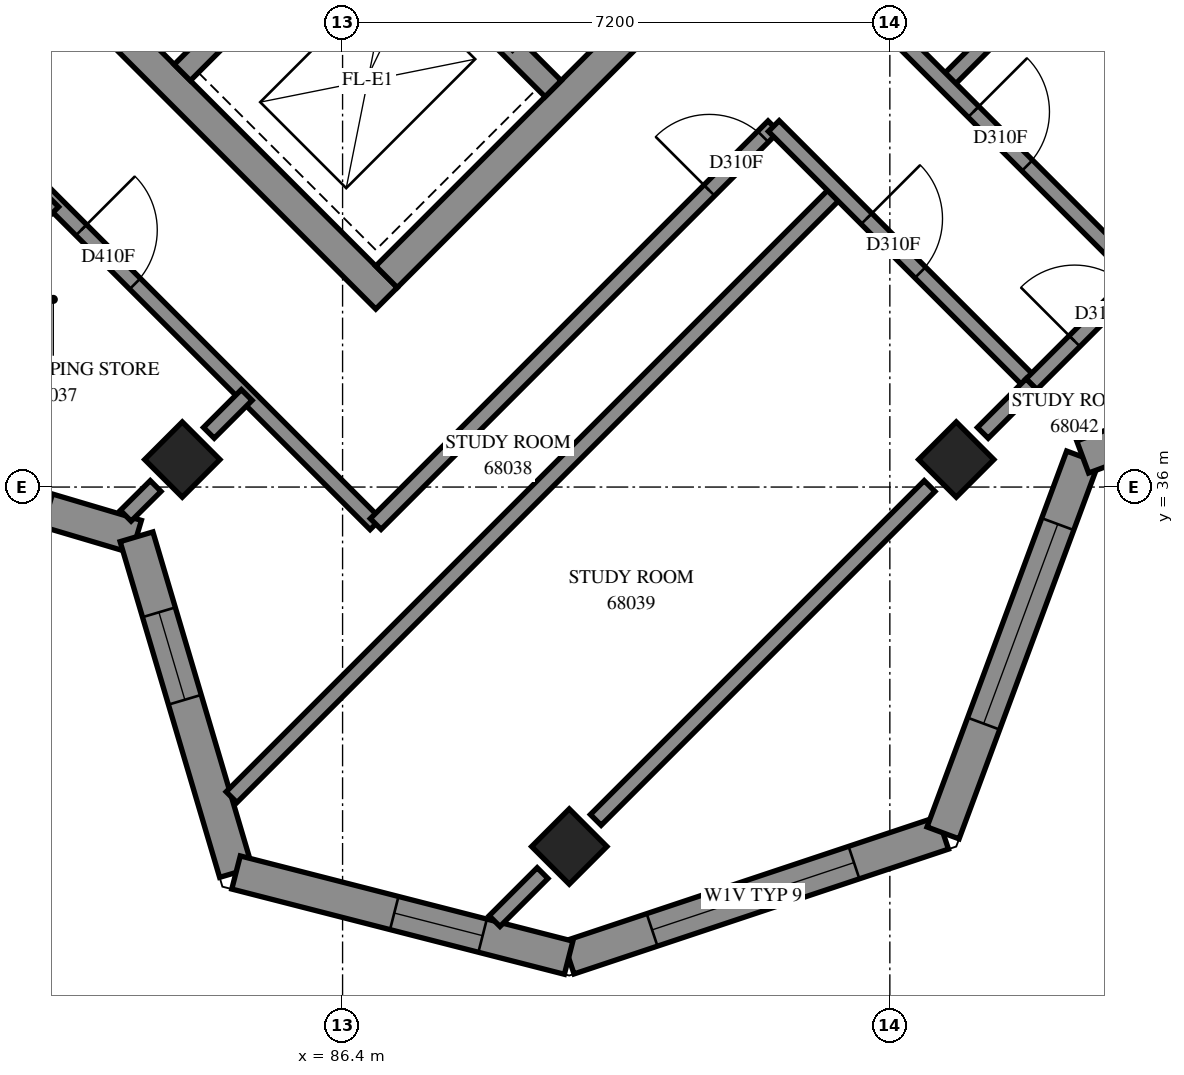
"""IFC4 building model, lengths in metres.
Left out: names, types, materials, properties, quantities, classifications, styles, units other than length and angle.
Written with IfcOpenShell. Run it as: python <this file> out.ifc"""

import sys

from ifc_helpers import new_model, si_unit, direction, frame, frame_2d, origin, origin_2d, place, context, subcontext, project, spatial, polyline, rectangle, outline, extrude, element, fill, save


model = new_model("IFC4")
c1 = context("Model", 3, precision=1e-05, world=origin(), true_north=direction((0.0, 1.0)))
c2 = subcontext(c1, "Body", "Model", "MODEL_VIEW")
j1 = project(units=[si_unit("LENGTHUNIT", "METRE"), si_unit("PLANEANGLEUNIT", "RADIAN")], contexts=[c1])
p1 = place(None, origin())
s1 = spatial("IfcSite", under=j1, at=p1, CompositionType="ELEMENT")
p2 = place(p1, origin())
s2 = spatial("IfcBuilding", under=s1, at=p2, CompositionType="ELEMENT")
p3 = place(p2, frame((0.0, 0.0, 250.6)))
s3 = spatial("IfcBuildingStorey", under=s2, at=p3, CompositionType="ELEMENT", Elevation=250.6)
for number, where, z_axis, x_axis in (
    (1, (84.291, 36.362, 0.0), (0.0, 0.0, 1.0), (0.707, -0.707, 0.0)),
    (2, (94.474, 36.362, 0.0), (0.0, 0.0, 1.0), (0.707, -0.707, 0.0)),
    (3, (89.382, 31.271, 0.0), (0.0, 0.0, 1.0), (0.707, -0.707, 0.0)),
):
    element("IfcColumn", number, at=place(p3, frame(where, z_axis=z_axis, x_axis=x_axis)), inside=s3, PredefinedType="COLUMN", context=c2, shape_type="SweptSolid", body=[
        extrude(rectangle(XDim=0.7, YDim=0.7, at=origin_2d()), origin(), (0.0, 0.0, 1.0), 3.1),
    ])
p4 = place(p3, frame((76.23, 49.231, -0.3), z_axis=(0.0, 0.0, 1.0), x_axis=(0.7071034917, -0.7071100706, 0.0)))
e4 = element("IfcWall", 4, at=p4, inside=s3, PredefinedType="SHEAR", context=c2, shape_type="SweptSolid", body=[
    extrude(rectangle(XDim=15.2, YDim=0.4, at=frame_2d((7.6, 0.0))), origin(), (0.0, 0.0, 1.0), 2.7),
])
p5 = place(p3, frame((86.978, 38.766, -0.3), z_axis=(0.0, 0.0, 1.0), x_axis=(0.7071067812, 0.7071067812, 0.0)))
e5 = element("IfcWall", 5, at=p5, inside=s3, PredefinedType="SHEAR", context=c2, shape_type="SweptSolid", body=[
    extrude(rectangle(XDim=14.4, YDim=0.4, at=frame_2d((7.2, 0.0))), origin(), (0.0, 0.0, 1.0), 2.7),
])
p6 = place(p5, frame((4.55, 0.0, 0.3)))
e6 = element("IfcOpeningElement", 6, at=p6, cuts=e5, PredefinedType="OPENING", context=c2, shape_type="SweptSolid", body=[
    extrude(rectangle(XDim=1.1, YDim=2.1, at=frame_2d((0.55, 1.05))), frame((0.0, 0.21, 0.0), z_axis=(0.0, -1.0, 0.0), x_axis=(1.0, 0.0, 0.0)), (0.0, 0.0, 1.0), 0.42),
])
p7 = place(p5, frame((11.35, 0.0, 0.3)))
e7 = element("IfcOpeningElement", 7, at=p7, cuts=e5, PredefinedType="OPENING", context=c2, shape_type="SweptSolid", body=[
    extrude(rectangle(XDim=1.1, YDim=2.1, at=frame_2d((0.55, 1.05))), frame((0.0, 0.21, 0.0), z_axis=(0.0, -1.0, 0.0), x_axis=(1.0, 0.0, 0.0)), (0.0, 0.0, 1.0), 0.42),
])
p8 = place(p3, frame((84.291, 41.453, 0.0), z_axis=(0.0, 0.0, 1.0), x_axis=(0.7071067812, 0.7071067812, 0.0)))
e8 = element("IfcWall", 8, at=p8, inside=s3, PredefinedType="SOLIDWALL", context=c2, shape_type="SweptSolid", body=[
    extrude(rectangle(XDim=3.3, YDim=0.3, at=frame_2d((1.65, 0.0))), origin(), (0.0, 0.0, 1.0), 3.1),
])
p9 = place(p3, frame((78.988, 51.423, 0.0), z_axis=(0.0, 0.0, 1.0), x_axis=(0.7071067812, -0.7071067812, 0.0)))
e9 = element("IfcWall", 9, at=p9, inside=s3, PredefinedType="SOLIDWALL", context=c2, shape_type="SweptSolid", body=[
    extrude(rectangle(XDim=14.4, YDim=0.3, at=frame_2d((7.2, 0.0))), origin(), (0.0, 0.0, 1.0), 3.1),
])
p10 = place(p9, frame((1.35, 0.0, 0.0)))
e10 = element("IfcOpeningElement", 10, at=p10, cuts=e9, PredefinedType="OPENING", context=c2, shape_type="SweptSolid", body=[
    extrude(rectangle(XDim=0.9, YDim=2.1, at=frame_2d((0.45, 1.05))), frame((0.0, 0.16, 0.0), z_axis=(0.0, -1.0, 0.0), x_axis=(1.0, 0.0, 0.0)), (0.0, 0.0, 1.0), 0.32),
])
p11 = place(p9, frame((4.95, 0.0, 0.0)))
e11 = element("IfcOpeningElement", 11, at=p11, cuts=e9, PredefinedType="OPENING", context=c2, shape_type="SweptSolid", body=[
    extrude(rectangle(XDim=0.9, YDim=2.1, at=frame_2d((0.45, 1.05))), frame((0.0, 0.16, 0.0), z_axis=(0.0, -1.0, 0.0), x_axis=(1.0, 0.0, 0.0)), (0.0, 0.0, 1.0), 0.32),
])
p12 = place(p9, frame((8.55, 0.0, 0.0)))
e12 = element("IfcOpeningElement", 12, at=p12, cuts=e9, PredefinedType="OPENING", context=c2, shape_type="SweptSolid", body=[
    extrude(rectangle(XDim=0.9, YDim=2.1, at=frame_2d((0.45, 1.05))), frame((0.0, 0.16, 0.0), z_axis=(0.0, -1.0, 0.0), x_axis=(1.0, 0.0, 0.0)), (0.0, 0.0, 1.0), 0.32),
])
p13 = place(p9, frame((12.05, 0.0, 0.0)))
e13 = element("IfcOpeningElement", 13, at=p13, cuts=e9, PredefinedType="OPENING", context=c2, shape_type="SweptSolid", body=[
    extrude(rectangle(XDim=1.1, YDim=2.1, at=frame_2d((0.55, 1.05))), frame((0.0, 0.16, 0.0), z_axis=(0.0, -1.0, 0.0), x_axis=(1.0, 0.0, 0.0)), (0.0, 0.0, 1.0), 0.32),
])
p14 = place(p3, frame((89.374, 29.808, 0.0), z_axis=(0.0, 0.0, 1.0), x_axis=(0.9486852239, 0.3162219885, 0.0)))
e14 = element("IfcWall", 14, at=p14, inside=s3, PredefinedType="SOLIDWALL", context=c2, shape_type="SweptSolid", body=[
    extrude(outline(polyline([(-0.066, -0.225), (5.3, -0.225), (5.085, 0.225), (0.066, 0.225), (-0.066, -0.225)])), origin(), (0.0, 0.0, 1.0), 3.1),
])
p15 = place(p14, frame((1.157, 0.0, 0.45)))
e15 = element("IfcOpeningElement", 15, at=p15, cuts=e14, PredefinedType="OPENING", context=c2, shape_type="SweptSolid", body=[
    extrude(rectangle(XDim=2.8, YDim=2.55, at=frame_2d((1.4, 1.275))), frame((0.0, 0.235, 0.0), z_axis=(0.0, -1.0, 0.0), x_axis=(1.0, 0.0, 0.0)), (0.0, 0.0, 1.0), 0.47),
])
p16 = place(p3, frame((94.3, 31.45, 0.0), z_axis=(0.0, 0.0, 1.0), x_axis=(0.3481927166, 0.9374229739, 0.0)))
e16 = element("IfcWall", 16, at=p16, inside=s3, PredefinedType="SOLIDWALL", context=c2, shape_type="SweptSolid", body=[
    extrude(outline(polyline([(-0.108, -0.225), (5.172, -0.225), (5.379, 0.225), (0.108, 0.225), (-0.108, -0.225)])), origin(), (0.0, 0.0, 1.0), 3.1),
])
p17 = place(p16, frame((1.534, 0.0, 0.45)))
e17 = element("IfcOpeningElement", 17, at=p17, cuts=e16, PredefinedType="OPENING", context=c2, shape_type="SweptSolid", body=[
    extrude(rectangle(XDim=2.8, YDim=2.55, at=frame_2d((1.4, 1.275))), frame((0.0, 0.235, 0.0), z_axis=(0.0, -1.0, 0.0), x_axis=(1.0, 0.0, 0.0)), (0.0, 0.0, 1.0), 0.47),
])
p18 = place(p3, frame((96.137, 36.395, 0.0), z_axis=(0.0, 0.0, 1.0), x_axis=(0.937429161, 0.3481760591, 0.0)))
e18 = element("IfcWall", 18, at=p18, inside=s3, PredefinedType="SOLIDWALL", context=c2, shape_type="SweptSolid", body=[
    extrude(outline(polyline([(0.103, -0.225), (5.383, -0.225), (5.168, 0.225), (-0.103, 0.225), (0.103, -0.225)])), origin(), (0.0, 0.0, 1.0), 3.1),
])
p19 = place(p18, frame((1.651, 0.0, 0.45)))
e19 = element("IfcOpeningElement", 19, at=p19, cuts=e18, PredefinedType="OPENING", context=c2, shape_type="SweptSolid", body=[
    extrude(rectangle(XDim=2.8, YDim=2.55, at=frame_2d((1.4, 1.275))), frame((0.0, 0.235, 0.0), z_axis=(0.0, -1.0, 0.0), x_axis=(1.0, 0.0, 0.0)), (0.0, 0.0, 1.0), 0.47),
])
p20 = place(p3, frame((79.272, 36.655, 0.0), z_axis=(0.0, 0.0, 1.0), x_axis=(0.9587656954, -0.2841977151, 0.0)))
e20 = element("IfcWall", 20, at=p20, inside=s3, PredefinedType="SOLIDWALL", context=c2, shape_type="SweptSolid", body=[
    extrude(outline(polyline([(-0.128, -0.225), (4.484, -0.225), (4.729, 0.225), (0.128, 0.225), (-0.128, -0.225)])), origin(), (0.0, 0.0, 1.0), 3.1),
])
p21 = place(p20, frame((0.603, 0.0, 0.45)))
e21 = element("IfcOpeningElement", 21, at=p21, cuts=e20, PredefinedType="OPENING", context=c2, shape_type="SweptSolid", body=[
    extrude(rectangle(XDim=2.8, YDim=2.55, at=frame_2d((1.4, 1.275))), frame((0.0, 0.235, 0.0), z_axis=(0.0, -1.0, 0.0), x_axis=(1.0, 0.0, 0.0)), (0.0, 0.0, 1.0), 0.47),
])
p22 = place(p3, frame((83.689, 35.346, 0.0), z_axis=(0.0, 0.0, 1.0), x_axis=(0.2841977151, -0.9587656954, 0.0)))
e22 = element("IfcWall", 22, at=p22, inside=s3, PredefinedType="SOLIDWALL", context=c2, shape_type="SweptSolid", body=[
    extrude(outline(polyline([(0.122, -0.225), (4.734, -0.225), (4.479, 0.225), (-0.122, 0.225), (0.122, -0.225)])), origin(), (0.0, 0.0, 1.0), 3.1),
])
p23 = place(p22, frame((1.036, 0.0, 0.45)))
e23 = element("IfcOpeningElement", 23, at=p23, cuts=e22, PredefinedType="OPENING", context=c2, shape_type="SweptSolid", body=[
    extrude(rectangle(XDim=1.2, YDim=2.55, at=frame_2d((0.6, 1.275))), frame((0.0, 0.235, 0.0), z_axis=(0.0, -1.0, 0.0), x_axis=(1.0, 0.0, 0.0)), (0.0, 0.0, 1.0), 0.47),
])
p24 = place(p3, frame((84.998, 30.929, 0.0), z_axis=(0.0, 0.0, 1.0), x_axis=(0.9687037334, -0.2482198158, 0.0)))
e24 = element("IfcWall", 24, at=p24, inside=s3, PredefinedType="SOLIDWALL", context=c2, shape_type="SweptSolid", body=[
    extrude(outline(polyline([(-0.128, -0.225), (4.583, -0.225), (4.451, 0.225), (0.128, 0.225), (-0.128, -0.225)])), origin(), (0.0, 0.0, 1.0), 3.1),
])
p25 = place(p24, frame((2.149, 0.0, 0.45)))
e25 = element("IfcOpeningElement", 25, at=p25, cuts=e24, PredefinedType="OPENING", context=c2, shape_type="SweptSolid", body=[
    extrude(rectangle(XDim=1.2, YDim=2.55, at=frame_2d((0.6, 1.275))), frame((0.0, 0.235, 0.0), z_axis=(0.0, -1.0, 0.0), x_axis=(1.0, 0.0, 0.0)), (0.0, 0.0, 1.0), 0.47),
])
p26 = place(p3, frame((84.939, 31.92, 0.0), z_axis=(0.0, 0.0, 1.0), x_axis=(0.7071067812, 0.7071067812, 0.0)))
e26 = element("IfcWall", 26, at=p26, inside=s3, PredefinedType="PARTITIONING", context=c2, shape_type="SweptSolid", body=[
    extrude(rectangle(XDim=11.283, YDim=0.2, at=frame_2d((5.641, 0.0))), origin(), (0.0, 0.0, 1.0), 3.1),
])
p27 = place(p3, frame((80.747, 41.597, 0.0), z_axis=(0.0, 0.0, 1.0), x_axis=(0.7071067812, -0.7071067812, 0.0)))
e27 = element("IfcWall", 27, at=p27, inside=s3, PredefinedType="PARTITIONING", context=c2, shape_type="SweptSolid", body=[
    extrude(rectangle(XDim=8.607, YDim=0.2, at=frame_2d((4.303, 0.0))), origin(), (0.0, 0.0, 1.0), 3.1),
])
p28 = place(p27, frame((0.195, 0.0, 0.0)))
e28 = element("IfcOpeningElement", 28, at=p28, cuts=e27, PredefinedType="OPENING", context=c2, shape_type="SweptSolid", body=[
    extrude(rectangle(XDim=1.0, YDim=2.1, at=frame_2d((0.5, 1.05))), frame((0.0, 0.11, 0.0), z_axis=(0.0, -1.0, 0.0), x_axis=(1.0, 0.0, 0.0)), (0.0, 0.0, 1.0), 0.22),
])
p29 = place(p27, frame((3.133, 0.0, 0.0)))
e29 = element("IfcOpeningElement", 29, at=p29, cuts=e27, PredefinedType="OPENING", context=c2, shape_type="SweptSolid", body=[
    extrude(rectangle(XDim=1.0, YDim=2.1, at=frame_2d((0.5, 1.05))), frame((0.0, 0.11, 0.0), z_axis=(0.0, -1.0, 0.0), x_axis=(1.0, 0.0, 0.0)), (0.0, 0.0, 1.0), 0.22),
])
p30 = place(p3, frame((86.836, 35.514, 0.0), z_axis=(0.0, 0.0, 1.0), x_axis=(0.7071067812, 0.7071067812, 0.0)))
e30 = element("IfcWall", 30, at=p30, inside=s3, PredefinedType="PARTITIONING", context=c2, shape_type="SweptSolid", body=[
    extrude(rectangle(XDim=7.399, YDim=0.2, at=frame_2d((3.7, 0.0))), origin(), (0.0, 0.0, 1.0), 3.1),
])
p31 = place(p30, frame((6.207, 0.0, 0.0)))
e31 = element("IfcOpeningElement", 31, at=p31, cuts=e30, PredefinedType="OPENING", context=c2, shape_type="SweptSolid", body=[
    extrude(rectangle(XDim=1.0, YDim=2.1, at=frame_2d((0.5, 1.05))), frame((0.0, 0.11, 0.0), z_axis=(0.0, -1.0, 0.0), x_axis=(1.0, 0.0, 0.0)), (0.0, 0.0, 1.0), 0.22),
])
p32 = place(p3, frame((94.331, 41.313, 0.0), z_axis=(0.0, 0.0, 1.0), x_axis=(0.7071139756, 0.7070995867, 0.0)))
e32 = element("IfcWall", 32, at=p32, inside=s3, PredefinedType="PARTITIONING", context=c2, shape_type="SweptSolid", body=[
    extrude(rectangle(XDim=6.95, YDim=0.2, at=frame_2d((3.475, 0.0))), origin(), (0.0, 0.0, 1.0), 3.1),
])
p33 = place(p3, frame((89.731, 31.621, 0.0), z_axis=(0.0, 0.0, 1.0), x_axis=(0.7071067812, 0.7071067812, 0.0)))
e33 = element("IfcWall", 33, at=p33, inside=s3, PredefinedType="PARTITIONING", context=c2, shape_type="SweptSolid", body=[
    extrude(rectangle(XDim=6.211, YDim=0.2, at=frame_2d((3.106, 0.0))), origin(), (0.0, 0.0, 1.0), 2.6),
])
p34 = place(p3, frame((93.481, 42.157, 0.0), z_axis=(0.0, 0.0, 1.0), x_axis=(0.7071067812, -0.7071067812, 0.0)))
e34 = element("IfcWall", 34, at=p34, inside=s3, PredefinedType="PARTITIONING", context=c2, shape_type="SweptSolid", body=[
    extrude(rectangle(XDim=4.8, YDim=0.2, at=frame_2d((2.4, 0.0))), origin(), (0.0, 0.0, 1.0), 3.1),
])
p35 = place(p34, frame((1.725, 0.0, 0.0)))
e35 = element("IfcOpeningElement", 35, at=p35, cuts=e34, PredefinedType="OPENING", context=c2, shape_type="SweptSolid", body=[
    extrude(rectangle(XDim=1.0, YDim=2.1, at=frame_2d((0.5, 1.05))), frame((0.0, 0.11, 0.0), z_axis=(0.0, -1.0, 0.0), x_axis=(1.0, 0.0, 0.0)), (0.0, 0.0, 1.0), 0.22),
])
p36 = place(p3, frame((92.073, 40.749, 0.0), z_axis=(0.0, 0.0, 1.0), x_axis=(0.7071067812, -0.7071067812, 0.0)))
e36 = element("IfcWall", 36, at=p36, inside=s3, PredefinedType="PARTITIONING", context=c2, shape_type="SweptSolid", body=[
    extrude(rectangle(XDim=4.8, YDim=0.2, at=frame_2d((2.4, 0.0))), origin(), (0.0, 0.0, 1.0), 3.1),
])
p37 = place(p36, frame((1.725, 0.0, 0.0)))
e37 = element("IfcOpeningElement", 37, at=p37, cuts=e36, PredefinedType="OPENING", context=c2, shape_type="SweptSolid", body=[
    extrude(rectangle(XDim=1.0, YDim=2.1, at=frame_2d((0.5, 1.05))), frame((0.0, 0.11, 0.0), z_axis=(0.0, -1.0, 0.0), x_axis=(1.0, 0.0, 0.0)), (0.0, 0.0, 1.0), 0.22),
])
p38 = place(p3, frame((79.623, 36.786, 0.0), z_axis=(0.0, 0.0, 1.0), x_axis=(0.7071186822, 0.7070948799, 0.0)))
e38 = element("IfcWall", 38, at=p38, inside=s3, PredefinedType="PARTITIONING", context=c2, shape_type="SweptSolid", body=[
    extrude(rectangle(XDim=4.201, YDim=0.2, at=frame_2d((2.101, 0.0))), origin(), (0.0, 0.0, 1.0), 3.1),
])
p39 = place(p3, frame((95.463, 37.353, 0.0), z_axis=(0.0, 0.0, 1.0), x_axis=(0.7071067812, 0.7071067812, 0.0)))
e39 = element("IfcWall", 39, at=p39, inside=s3, PredefinedType="PARTITIONING", context=c2, shape_type="SweptSolid", body=[
    extrude(rectangle(XDim=2.0, YDim=0.2, at=frame_2d((1.0, 0.0))), origin(), (0.0, 0.0, 1.0), 2.6),
])
p40 = place(p39, frame((0.802, 0.0, 0.0)))
e40 = element("IfcOpeningElement", 40, at=p40, cuts=e39, PredefinedType="OPENING", context=c2, shape_type="SweptSolid", body=[
    extrude(rectangle(XDim=1.0, YDim=2.1, at=frame_2d((0.5, 1.05))), frame((0.0, 0.11, 0.0), z_axis=(0.0, -1.0, 0.0), x_axis=(1.0, 0.0, 0.0)), (0.0, 0.0, 1.0), 0.22),
])
p41 = place(p3, frame((94.823, 36.713, 0.0), z_axis=(0.0, 0.0, 1.0), x_axis=(0.7071067812, 0.7071067812, 0.0)))
e41 = element("IfcWall", 41, at=p41, inside=s3, PredefinedType="PARTITIONING", context=c2, shape_type="SweptSolid", body=[
    extrude(rectangle(XDim=0.905, YDim=0.2, at=frame_2d((0.453, 0.0))), origin(), (0.0, 0.0, 1.0), 2.6),
])
p42 = place(p3, frame((88.4, 30.29, 0.0), z_axis=(0.0, 0.0, 1.0), x_axis=(0.7071067812, 0.7071067812, 0.0)))
e42 = element("IfcWall", 42, at=p42, inside=s3, PredefinedType="PARTITIONING", context=c2, shape_type="SweptSolid", body=[
    extrude(rectangle(XDim=0.892, YDim=0.2, at=frame_2d((0.446, 0.0))), origin(), (0.0, 0.0, 1.0), 3.1),
])
p43 = place(p3, frame((84.641, 36.713, 0.0), z_axis=(0.0, 0.0, 1.0), x_axis=(0.7071067812, 0.7071067812, 0.0)))
e43 = element("IfcWall", 43, at=p43, inside=s3, PredefinedType="PARTITIONING", context=c2, shape_type="SweptSolid", body=[
    extrude(rectangle(XDim=0.704, YDim=0.2, at=frame_2d((0.352, 0.0))), origin(), (0.0, 0.0, 1.0), 3.1),
])
p44 = place(p3, frame((83.547, 35.623, 0.0), z_axis=(0.0, 0.0, 1.0), x_axis=(0.7091778861, 0.7050295922, 0.0)))
e44 = element("IfcWall", 44, at=p44, inside=s3, PredefinedType="PARTITIONING", context=c2, shape_type="SweptSolid", body=[
    extrude(rectangle(XDim=0.554, YDim=0.2, at=frame_2d((0.277, 0.0))), origin(), (0.0, 0.0, 1.0), 3.1),
])
p45 = place(p15, origin())
e45 = element("IfcWindow", 45, at=p45, inside=s3, PartitioningType="SINGLE_PANEL", PredefinedType="WINDOW", context=c2, shape_type="SweptSolid", body=[
    extrude(rectangle(XDim=2.8, YDim=2.55, at=frame_2d((1.4, 1.275))), frame((0.0, 0.205, 0.0), z_axis=(0.0, -1.0, 0.0), x_axis=(1.0, 0.0, 0.0)), (0.0, 0.0, 1.0), 0.06),
])
fill(e15, e45)
p46 = place(p17, origin())
e46 = element("IfcWindow", 46, at=p46, inside=s3, PartitioningType="SINGLE_PANEL", PredefinedType="WINDOW", context=c2, shape_type="SweptSolid", body=[
    extrude(rectangle(XDim=2.8, YDim=2.55, at=frame_2d((1.4, 1.275))), frame((0.0, 0.205, 0.0), z_axis=(0.0, -1.0, 0.0), x_axis=(1.0, 0.0, 0.0)), (0.0, 0.0, 1.0), 0.06),
])
fill(e17, e46)
p47 = place(p21, origin())
e47 = element("IfcWindow", 47, at=p47, inside=s3, PartitioningType="SINGLE_PANEL", PredefinedType="WINDOW", context=c2, shape_type="SweptSolid", body=[
    extrude(rectangle(XDim=2.8, YDim=2.55, at=frame_2d((1.4, 1.275))), frame((0.0, 0.205, 0.0), z_axis=(0.0, -1.0, 0.0), x_axis=(1.0, 0.0, 0.0)), (0.0, 0.0, 1.0), 0.06),
])
fill(e21, e47)
p48 = place(p23, origin())
e48 = element("IfcWindow", 48, at=p48, inside=s3, PartitioningType="SINGLE_PANEL", PredefinedType="WINDOW", context=c2, shape_type="SweptSolid", body=[
    extrude(rectangle(XDim=1.2, YDim=2.55, at=frame_2d((0.6, 1.275))), frame((0.0, 0.205, 0.0), z_axis=(0.0, -1.0, 0.0), x_axis=(1.0, 0.0, 0.0)), (0.0, 0.0, 1.0), 0.06),
])
fill(e23, e48)
p49 = place(p25, origin())
e49 = element("IfcWindow", 49, at=p49, inside=s3, PartitioningType="SINGLE_PANEL", PredefinedType="WINDOW", context=c2, shape_type="SweptSolid", body=[
    extrude(rectangle(XDim=1.2, YDim=2.55, at=frame_2d((0.6, 1.275))), frame((0.0, 0.205, 0.0), z_axis=(0.0, -1.0, 0.0), x_axis=(1.0, 0.0, 0.0)), (0.0, 0.0, 1.0), 0.06),
])
fill(e25, e49)
p50 = place(p29, origin())
e50 = element("IfcDoor", 50, at=p50, inside=s3, OperationType="SINGLE_SWING_LEFT", PredefinedType="DOOR", context=c2, shape_type="SweptSolid", body=[
    extrude(rectangle(XDim=1.0, YDim=2.1, at=frame_2d((0.5, 1.05))), frame((0.0, 0.025, 0.0), z_axis=(0.0, -1.0, 0.0), x_axis=(1.0, 0.0, 0.0)), (0.0, 0.0, 1.0), 0.05),
])
fill(e29, e50)
p51 = place(p31, origin())
e51 = element("IfcDoor", 51, at=p51, inside=s3, OperationType="SINGLE_SWING_RIGHT", PredefinedType="DOOR", context=c2, shape_type="SweptSolid", body=[
    extrude(rectangle(XDim=1.0, YDim=2.1, at=frame_2d((0.5, 1.05))), frame((0.0, 0.025, 0.0), z_axis=(0.0, -1.0, 0.0), x_axis=(1.0, 0.0, 0.0)), (0.0, 0.0, 1.0), 0.05),
])
fill(e31, e51)
p52 = place(p37, origin())
e52 = element("IfcDoor", 52, at=p52, inside=s3, OperationType="SINGLE_SWING_LEFT", PredefinedType="DOOR", context=c2, shape_type="SweptSolid", body=[
    extrude(rectangle(XDim=1.0, YDim=2.1, at=frame_2d((0.5, 1.05))), frame((0.0, 0.025, 0.0), z_axis=(0.0, -1.0, 0.0), x_axis=(1.0, 0.0, 0.0)), (0.0, 0.0, 1.0), 0.05),
])
fill(e37, e52)
p53 = place(p35, origin())
e53 = element("IfcDoor", 53, at=p53, inside=s3, OperationType="SINGLE_SWING_RIGHT", PredefinedType="DOOR", context=c2, shape_type="SweptSolid", body=[
    extrude(rectangle(XDim=1.0, YDim=2.1, at=frame_2d((0.5, 1.05))), frame((0.0, 0.025, 0.0), z_axis=(0.0, -1.0, 0.0), x_axis=(1.0, 0.0, 0.0)), (0.0, 0.0, 1.0), 0.05),
])
fill(e35, e53)
p54 = place(p40, origin())
e54 = element("IfcDoor", 54, at=p54, inside=s3, OperationType="SINGLE_SWING_RIGHT", PredefinedType="DOOR", context=c2, shape_type="SweptSolid", body=[
    extrude(rectangle(XDim=1.0, YDim=2.1, at=frame_2d((0.5, 1.05))), frame((0.0, 0.025, 0.0), z_axis=(0.0, -1.0, 0.0), x_axis=(1.0, 0.0, 0.0)), (0.0, 0.0, 1.0), 0.05),
])
fill(e40, e54)
save(model, sys.argv[1])
